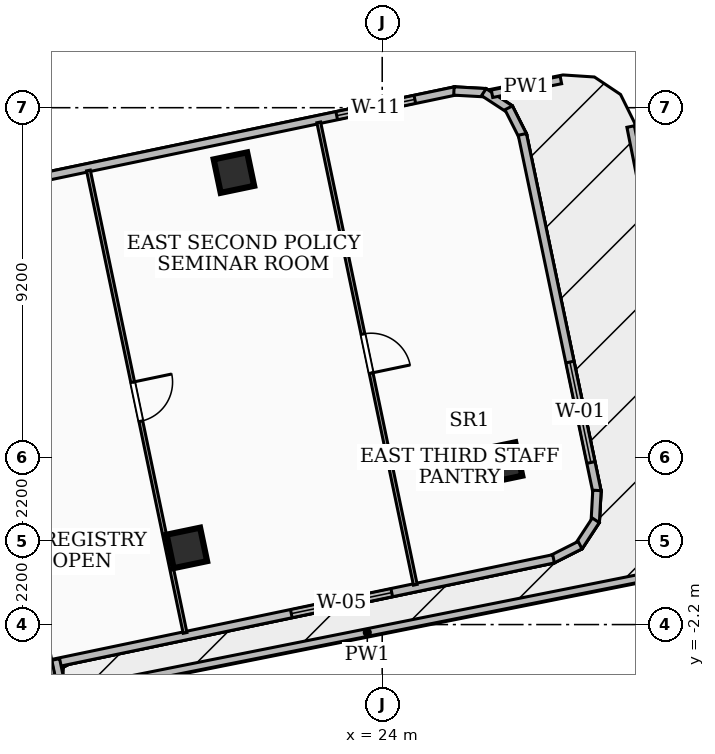
"""IFC4 building model, lengths in metres.
Left out: names, types, materials, properties, quantities, classifications, styles, units other than length and angle.
Written with IfcOpenShell. Run it as: python <this file> out.ifc"""

import sys

from ifc_helpers import new_model, si_unit, direction, frame, frame_2d, origin, origin_2d, place, context, subcontext, project, spatial, rectangle, extrude, element, fill, save


model = new_model("IFC4")
c1 = context("Model", 3, precision=1e-05, world=origin(), true_north=direction((0.0, 1.0)))
c2 = subcontext(c1, "Body", "Model", "MODEL_VIEW")
j1 = project(units=[si_unit("LENGTHUNIT", "METRE"), si_unit("PLANEANGLEUNIT", "RADIAN")], contexts=[c1])
p1 = place(None, origin())
s1 = spatial("IfcSite", under=j1, at=p1, CompositionType="ELEMENT")
p2 = place(p1, origin())
s2 = spatial("IfcBuilding", under=s1, at=p2, CompositionType="ELEMENT")
p3 = place(p2, frame((0.0, 0.0, 111.96)))
s3 = spatial("IfcBuildingStorey", under=s2, at=p3, CompositionType="ELEMENT", Elevation=111.96)
for number, where, z_axis, x_axis in (
    (1, (18.86, -0.183, 0.0), (0.0, 0.0, 1.0), (0.979, 0.204, 0.0)),
    (2, (27.153, 2.064, 0.0), (0.0, 0.0, 1.0), (0.979, 0.204, 0.0)),
    (3, (20.098, 9.692, 0.0), (0.0, 0.0, 1.0), (0.979, 0.204, 0.0)),
):
    element("IfcColumn", number, at=place(p3, frame(where, z_axis=z_axis, x_axis=x_axis)), inside=s3, PredefinedType="COLUMN", context=c2, shape_type="SweptSolid", body=[
        extrude(rectangle(XDim=0.9, YDim=0.9, at=origin_2d()), origin(), (0.0, 0.0, 1.0), 4.32),
    ])
p4 = place(p3, frame((12.763, 9.092, 0.0), z_axis=(0.0, 0.0, 1.0), x_axis=(0.97886813171, 0.204492495517, 0.0)))
e4 = element("IfcWall", 4, at=p4, inside=s3, PredefinedType="SOLIDWALL", context=c2, shape_type="SweptSolid", body=[
    extrude(rectangle(XDim=13.458, YDim=0.22, at=frame_2d((6.729, 0.0))), origin(), (0.0, 0.0, 1.0), 4.06),
])
p5 = place(p4, frame((10.257, 0.0, 0.85)))
e5 = element("IfcOpeningElement", 5, at=p5, cuts=e4, PredefinedType="OPENING", context=c2, shape_type="SweptSolid", body=[
    extrude(rectangle(XDim=2.1, YDim=1.6, at=frame_2d((1.05, 0.8))), frame((0.0, 0.12, 0.0), z_axis=(0.0, -1.0, 0.0), x_axis=(1.0, 0.0, 0.0)), (0.0, 0.0, 1.0), 0.24),
])
p6 = place(p3, frame((25.887, 11.84, 0.0), z_axis=(0.0, 0.0, 1.0), x_axis=(0.998469344193, -0.05530794433, 0.0)))
e6 = element("IfcWall", 6, at=p6, inside=s3, PredefinedType="SOLIDWALL", context=c2, shape_type="SweptSolid", body=[
    extrude(rectangle(XDim=0.834, YDim=0.22, at=frame_2d((0.417, 0.0))), origin(), (0.0, 0.0, 1.0), 4.06),
])
p7 = place(p3, frame((26.674, 11.809, 0.0), z_axis=(0.0, 0.0, 1.0), x_axis=(0.836738727822, -0.54760232045, 0.0)))
e7 = element("IfcWall", 7, at=p7, inside=s3, PredefinedType="SOLIDWALL", context=c2, shape_type="SweptSolid", body=[
    extrude(rectangle(XDim=0.82, YDim=0.22, at=frame_2d((0.41, 0.0))), origin(), (0.0, 0.0, 1.0), 4.06),
])
p8 = place(p3, frame((27.328, 11.396, 0.0), z_axis=(0.0, 0.0, 1.0), x_axis=(0.450141805655, -0.892957084524, 0.0)))
e8 = element("IfcWall", 8, at=p8, inside=s3, PredefinedType="SOLIDWALL", context=c2, shape_type="SweptSolid", body=[
    extrude(rectangle(XDim=0.833, YDim=0.22, at=frame_2d((0.417, 0.0))), origin(), (0.0, 0.0, 1.0), 4.06),
])
p9 = place(p3, frame((27.687, 10.698, 0.0), z_axis=(0.0, 0.0, 1.0), x_axis=(0.204566309339, -0.978852708574, 0.0)))
e9 = element("IfcWall", 9, at=p9, inside=s3, PredefinedType="SOLIDWALL", context=c2, shape_type="SweptSolid", body=[
    extrude(rectangle(XDim=9.62, YDim=0.22, at=frame_2d((4.81, 0.0))), origin(), (0.0, 0.0, 1.0), 4.06),
])
p10 = place(p9, frame((6.12, 0.0, 0.85)))
e10 = element("IfcOpeningElement", 10, at=p10, cuts=e9, PredefinedType="OPENING", context=c2, shape_type="SweptSolid", body=[
    extrude(rectangle(XDim=2.7, YDim=2.1, at=frame_2d((1.35, 1.05))), frame((0.0, 0.12, 0.0), z_axis=(0.0, -1.0, 0.0), x_axis=(1.0, 0.0, 0.0)), (0.0, 0.0, 1.0), 0.24),
])
p11 = place(p3, frame((29.651, 1.33, 0.0), z_axis=(0.0, 0.0, 1.0), x_axis=(-0.055016197793, -0.998485462078, 0.0)))
e11 = element("IfcWall", 11, at=p11, inside=s3, PredefinedType="SOLIDWALL", context=c2, shape_type="SweptSolid", body=[
    extrude(rectangle(XDim=0.834, YDim=0.22, at=frame_2d((0.417, 0.0))), origin(), (0.0, 0.0, 1.0), 4.06),
])
p12 = place(p3, frame((29.62, 0.543, 0.0), z_axis=(0.0, 0.0, 1.0), x_axis=(-0.54835696222, -0.836244367386, 0.0)))
e12 = element("IfcWall", 12, at=p12, inside=s3, PredefinedType="SOLIDWALL", context=c2, shape_type="SweptSolid", body=[
    extrude(rectangle(XDim=0.819, YDim=0.22, at=frame_2d((0.41, 0.0))), origin(), (0.0, 0.0, 1.0), 4.06),
])
p13 = place(p3, frame((29.207, -0.11, 0.0), z_axis=(0.0, 0.0, 1.0), x_axis=(-0.892545226532, -0.450957890046, 0.0)))
e13 = element("IfcWall", 13, at=p13, inside=s3, PredefinedType="SOLIDWALL", context=c2, shape_type="SweptSolid", body=[
    extrude(rectangle(XDim=0.834, YDim=0.22, at=frame_2d((0.417, 0.0))), origin(), (0.0, 0.0, 1.0), 4.06),
])
p14 = place(p3, frame((28.509, -0.47, 0.0), z_axis=(0.0, 0.0, 1.0), x_axis=(-0.97885663995, -0.204547496749, 0.0)))
e14 = element("IfcWall", 14, at=p14, inside=s3, PredefinedType="SOLIDWALL", context=c2, shape_type="SweptSolid", body=[
    extrude(rectangle(XDim=13.459, YDim=0.22, at=frame_2d((6.729, 0.0))), origin(), (0.0, 0.0, 1.0), 4.06),
])
p15 = place(p14, frame((4.35, 0.0, 0.85)))
e15 = element("IfcOpeningElement", 15, at=p15, cuts=e14, PredefinedType="OPENING", context=c2, shape_type="SweptSolid", body=[
    extrude(rectangle(XDim=2.7, YDim=1.85, at=frame_2d((1.35, 0.925))), frame((0.0, 0.12, 0.0), z_axis=(0.0, -1.0, 0.0), x_axis=(1.0, 0.0, 0.0)), (0.0, 0.0, 1.0), 0.24),
])
p16 = place(p3, frame((15.403, -3.119, 0.0), z_axis=(0.0, 0.0, 1.0), x_axis=(0.204509735336, -0.978864530031, 0.0)))
e16 = element("IfcWall", 16, at=p16, inside=s3, PredefinedType="SOLIDWALL", context=c2, shape_type="SweptSolid", body=[
    extrude(rectangle(XDim=6.757, YDim=0.22, at=frame_2d((3.378, 0.0))), origin(), (0.0, 0.0, 1.0), 4.06),
])
p17 = place(p3, frame((15.919, -3.943, 0.0), z_axis=(0.0, 0.0, 1.0), x_axis=(0.980669803086, 0.195669970395, 0.0)))
e17 = element("IfcWall", 17, at=p17, inside=s3, PredefinedType="PARAPET", context=c2, shape_type="SweptSolid", body=[
    extrude(rectangle(XDim=15.68, YDim=0.2, at=frame_2d((7.84, 0.0))), origin(), (0.0, 0.0, 1.0), 0.88),
])
p18 = place(p3, frame((32.521, 0.96, 0.0), z_axis=(0.0, 0.0, 1.0), x_axis=(-0.195648466366, 0.980674093473, 0.0)))
e18 = element("IfcWall", 18, at=p18, inside=s3, PredefinedType="PARAPET", context=c2, shape_type="SweptSolid", body=[
    extrude(rectangle(XDim=10.14, YDim=0.2, at=frame_2d((5.07, 0.0))), origin(), (0.0, 0.0, 1.0), 0.88),
])
p19 = place(p3, frame((28.702, 12.129, 0.0), z_axis=(0.0, 0.0, 1.0), x_axis=(-0.980661857894, -0.195709786345, 0.0)))
e19 = element("IfcWall", 19, at=p19, inside=s3, PredefinedType="PARAPET", context=c2, shape_type="SweptSolid", body=[
    extrude(rectangle(XDim=1.849, YDim=0.2, at=frame_2d((0.924, 0.0))), origin(), (0.0, 0.0, 1.0), 0.88),
])
p20 = place(p3, frame((11.939, 12.73, 0.0), z_axis=(0.0, 0.0, 1.0), x_axis=(0.204503489908, -0.978865834839, 0.0)))
e20 = element("IfcWall", 20, at=p20, inside=s3, PredefinedType="PARTITIONING", context=c2, shape_type="SweptSolid", body=[
    extrude(rectangle(XDim=20.04, YDim=0.1, at=frame_2d((10.02, 0.0))), origin(), (0.0, 0.0, 1.0), 3.29),
])
p21 = place(p20, frame((9.42, 0.0, 0.0)))
e21 = element("IfcOpeningElement", 21, at=p21, cuts=e20, PredefinedType="OPENING", context=c2, shape_type="SweptSolid", body=[
    extrude(rectangle(XDim=1.2, YDim=2.1, at=frame_2d((0.6, 1.05))), frame((0.0, 0.06, 0.0), z_axis=(0.0, -1.0, 0.0), x_axis=(1.0, 0.0, 0.0)), (0.0, 0.0, 1.0), 0.12),
])
p22 = place(p3, frame((16.27, 9.748, 0.0), z_axis=(0.0, 0.0, 1.0), x_axis=(0.204509549155, -0.978864568929, 0.0)))
e22 = element("IfcWall", 22, at=p22, inside=s3, PredefinedType="PARTITIONING", context=c2, shape_type="SweptSolid", body=[
    extrude(rectangle(XDim=12.43, YDim=0.1, at=frame_2d((6.215, 0.0))), origin(), (0.0, 0.0, 1.0), 3.29),
])
p23 = place(p22, frame((5.69, 0.0, 0.0)))
e23 = element("IfcOpeningElement", 23, at=p23, cuts=e22, PredefinedType="OPENING", context=c2, shape_type="SweptSolid", body=[
    extrude(rectangle(XDim=1.05, YDim=2.08, at=frame_2d((0.525, 1.04))), frame((0.0, 0.06, 0.0), z_axis=(0.0, -1.0, 0.0), x_axis=(1.0, 0.0, 0.0)), (0.0, 0.0, 1.0), 0.12),
])
p24 = place(p3, frame((22.33, 11.014, 0.0), z_axis=(0.0, 0.0, 1.0), x_axis=(0.204434266469, -0.978880294364, 0.0)))
e24 = element("IfcWall", 24, at=p24, inside=s3, PredefinedType="PARTITIONING", context=c2, shape_type="SweptSolid", body=[
    extrude(rectangle(XDim=12.429, YDim=0.1, at=frame_2d((6.215, 0.0))), origin(), (0.0, 0.0, 1.0), 3.29),
])
p25 = place(p24, frame((5.69, 0.0, 0.0)))
e25 = element("IfcOpeningElement", 25, at=p25, cuts=e24, PredefinedType="OPENING", context=c2, shape_type="SweptSolid", body=[
    extrude(rectangle(XDim=1.05, YDim=2.08, at=frame_2d((0.525, 1.04))), frame((0.0, 0.06, 0.0), z_axis=(0.0, -1.0, 0.0), x_axis=(1.0, 0.0, 0.0)), (0.0, 0.0, 1.0), 0.12),
])
p26 = place(p5, origin())
e26 = element("IfcWindow", 26, at=p26, inside=s3, PartitioningType="SINGLE_PANEL", PredefinedType="WINDOW", context=c2, shape_type="SweptSolid", body=[
    extrude(rectangle(XDim=2.1, YDim=1.6, at=frame_2d((1.05, 0.8))), frame((0.0, 0.03, 0.0), z_axis=(0.0, -1.0, 0.0), x_axis=(1.0, 0.0, 0.0)), (0.0, 0.0, 1.0), 0.06),
])
fill(e5, e26)
p27 = place(p10, origin())
e27 = element("IfcWindow", 27, at=p27, inside=s3, PartitioningType="SINGLE_PANEL", PredefinedType="WINDOW", context=c2, shape_type="SweptSolid", body=[
    extrude(rectangle(XDim=2.7, YDim=2.1, at=frame_2d((1.35, 1.05))), frame((0.0, 0.03, 0.0), z_axis=(0.0, -1.0, 0.0), x_axis=(1.0, 0.0, 0.0)), (0.0, 0.0, 1.0), 0.06),
])
fill(e10, e27)
p28 = place(p15, origin())
e28 = element("IfcWindow", 28, at=p28, inside=s3, PartitioningType="SINGLE_PANEL", PredefinedType="WINDOW", context=c2, shape_type="SweptSolid", body=[
    extrude(rectangle(XDim=2.7, YDim=1.85, at=frame_2d((1.35, 0.925))), frame((0.0, 0.03, 0.0), z_axis=(0.0, -1.0, 0.0), x_axis=(1.0, 0.0, 0.0)), (0.0, 0.0, 1.0), 0.06),
])
fill(e15, e28)
p29 = place(p3, frame((0.0, 0.0, -0.26)))
p30 = place(p29, frame((30.194, 6.088, 0.0)))
p31 = place(p30, frame((0.0, 0.0, 0.21)))
e29 = element("IfcWindow", 29, at=p31, inside=s3, PartitioningType="SINGLE_PANEL", PredefinedType="SKYLIGHT", context=c2, shape_type="SweptSolid", body=[
    extrude(rectangle(XDim=1.2, YDim=1.2, at=origin_2d()), origin(), (0.0, 0.0, 1.0), 0.05),
])
p32 = place(p23, origin())
e30 = element("IfcDoor", 30, at=p32, inside=s3, OperationType="SINGLE_SWING_LEFT", PredefinedType="DOOR", context=c2, shape_type="SweptSolid", body=[
    extrude(rectangle(XDim=1.05, YDim=2.08, at=frame_2d((0.525, 1.04))), frame((0.0, 0.025, 0.0), z_axis=(0.0, -1.0, 0.0), x_axis=(1.0, 0.0, 0.0)), (0.0, 0.0, 1.0), 0.05),
])
fill(e23, e30)
p33 = place(p25, origin())
e31 = element("IfcDoor", 31, at=p33, inside=s3, OperationType="SINGLE_SWING_RIGHT", PredefinedType="DOOR", context=c2, shape_type="SweptSolid", body=[
    extrude(rectangle(XDim=1.05, YDim=2.08, at=frame_2d((0.525, 1.04))), frame((0.0, 0.025, 0.0), z_axis=(0.0, -1.0, 0.0), x_axis=(1.0, 0.0, 0.0)), (0.0, 0.0, 1.0), 0.05),
])
fill(e25, e31)
save(model, sys.argv[1])
